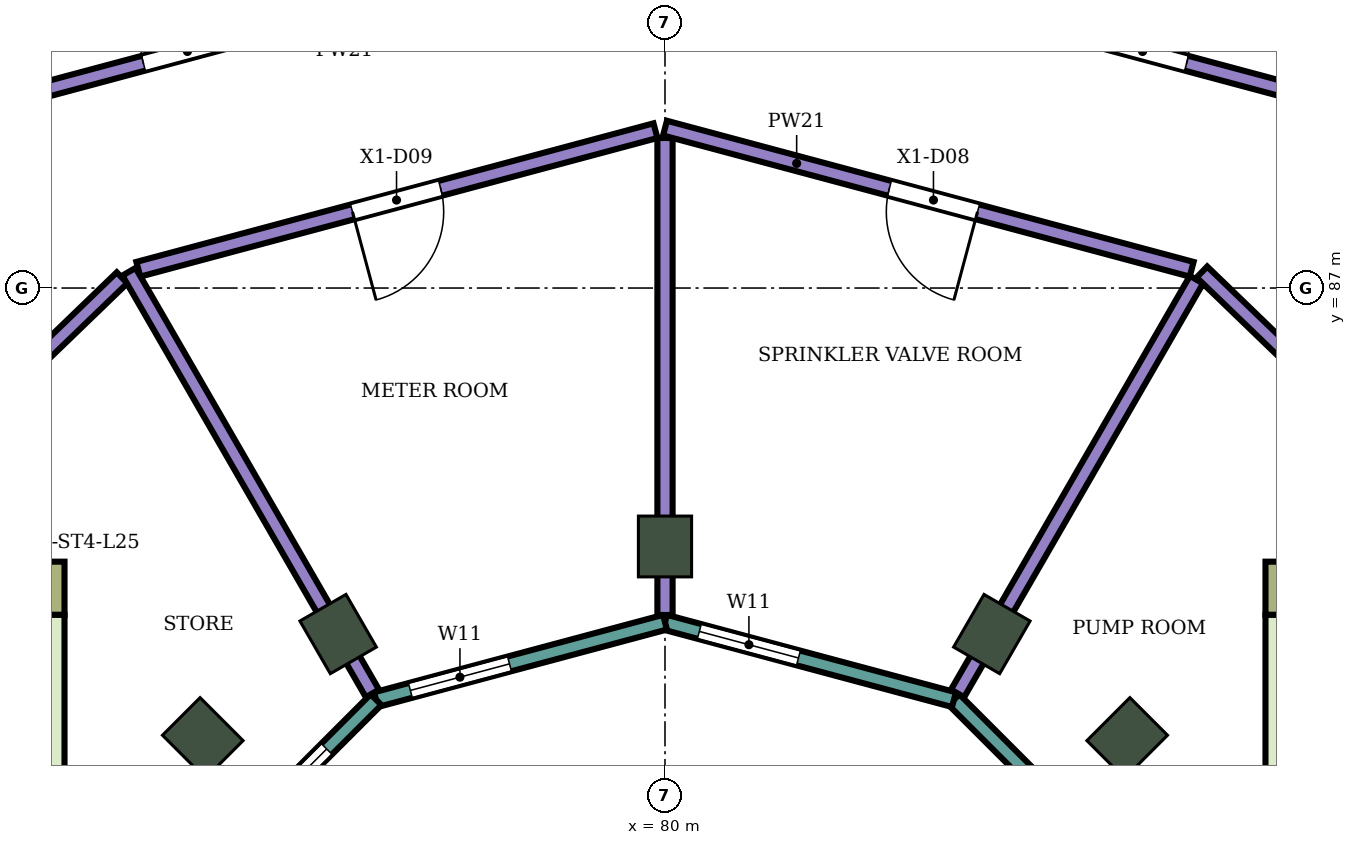
"""IFC4 building model, lengths in metres.
Left out: names, types, materials, properties, quantities, classifications, styles, units other than length and angle.
Written with IfcOpenShell. Run it as: python <this file> out.ifc"""

import sys

from ifc_helpers import new_model, si_unit, direction, frame, frame_2d, origin, origin_2d, place, context, subcontext, project, spatial, rectangle, extrude, element, fill, save


model = new_model("IFC4")
c1 = context("Model", 3, precision=1e-05, world=origin(), true_north=direction((0.0, 1.0)))
c2 = subcontext(c1, "Body", "Model", "MODEL_VIEW")
j1 = project(units=[si_unit("LENGTHUNIT", "METRE"), si_unit("PLANEANGLEUNIT", "RADIAN")], contexts=[c1])
p1 = place(None, origin())
s1 = spatial("IfcSite", under=j1, at=p1, CompositionType="ELEMENT")
p2 = place(p1, origin())
s2 = spatial("IfcBuilding", under=s1, at=p2, CompositionType="ELEMENT")
p3 = place(p2, frame((0.0, 0.0, 109.0)))
s3 = spatial("IfcBuildingStorey", under=s2, at=p3, CompositionType="ELEMENT", Elevation=109.0)
for number, where, z_axis, x_axis in (
    (1, (86.081, 81.081, 0.0), (0.0, 0.0, 1.0), (0.707, 0.707, 0.0)),
    (2, (84.3, 82.448, 0.0), (0.0, 0.0, 1.0), (0.5, 0.866, 0.0)),
    (3, (80.0, 83.6, 0.0), (0.0, 0.0, 1.0), (0.0, 1.0, 0.0)),
    (4, (75.7, 82.448, 0.0), (0.0, 0.0, 1.0), (-0.5, 0.866, 0.0)),
    (5, (73.919, 81.081, 0.0), (0.0, 0.0, 1.0), (-0.707, 0.707, 0.0)),
):
    element("IfcColumn", number, at=place(p3, frame(where, z_axis=z_axis, x_axis=x_axis)), inside=s3, PredefinedType="COLUMN", context=c2, shape_type="SweptSolid", body=[
        extrude(rectangle(XDim=0.8, YDim=0.7, at=origin_2d()), origin(), (0.0, 0.0, 1.0), 5.6),
    ])
p4 = place(p3, frame((87.9, 83.05, 0.0), z_axis=(0.0, 0.0, 1.0), x_axis=(1.0, 0.0, 0.0)))
e6 = element("IfcWall", 6, at=p4, inside=s3, PredefinedType="SHEAR", context=c2, shape_type="SweptSolid", body=[
    extrude(rectangle(XDim=14.8, YDim=0.7, at=frame_2d((7.4, 0.0))), origin(), (0.0, 0.0, 1.0), 5.28),
])
p5 = place(p4, frame((4.2, 0.0, 0.0)))
e7 = element("IfcOpeningElement", 7, at=p5, cuts=e6, PredefinedType="OPENING", context=c2, shape_type="SweptSolid", body=[
    extrude(rectangle(XDim=2.4, YDim=2.4, at=frame_2d((1.2, 1.2))), frame((0.0, 0.36, 0.0), z_axis=(0.0, -1.0, 0.0), x_axis=(1.0, 0.0, 0.0)), (0.0, 0.0, 1.0), 0.72),
])
p6 = place(p3, frame((88.125, 75.0, 0.0), z_axis=(0.0, 0.0, 1.0), x_axis=(0.0, 1.0, 0.0)))
e8 = element("IfcWall", 8, at=p6, inside=s3, PredefinedType="SHEAR", context=c2, shape_type="SweptSolid", body=[
    extrude(rectangle(XDim=7.7, YDim=0.45, at=frame_2d((3.85, 0.0))), origin(), (0.0, 0.0, 1.0), 5.28),
])
p7 = place(p3, frame((72.1, 83.05, 0.0), z_axis=(0.0, 0.0, 1.0), x_axis=(-1.0, 0.0, 0.0)))
e9 = element("IfcWall", 9, at=p7, inside=s3, PredefinedType="SHEAR", context=c2, shape_type="SweptSolid", body=[
    extrude(rectangle(XDim=14.8, YDim=0.7, at=frame_2d((7.4, 0.0))), origin(), (0.0, 0.0, 1.0), 5.28),
])
p8 = place(p7, frame((4.2, 0.0, 0.0)))
e10 = element("IfcOpeningElement", 10, at=p8, cuts=e9, PredefinedType="OPENING", context=c2, shape_type="SweptSolid", body=[
    extrude(rectangle(XDim=2.4, YDim=2.4, at=frame_2d((1.2, 1.2))), frame((0.0, 0.36, 0.0), z_axis=(0.0, -1.0, 0.0), x_axis=(1.0, 0.0, 0.0)), (0.0, 0.0, 1.0), 0.72),
])
p9 = place(p3, frame((71.875, 82.7, 0.0), z_axis=(0.0, 0.0, 1.0), x_axis=(0.0, -1.0, 0.0)))
e11 = element("IfcWall", 11, at=p9, inside=s3, PredefinedType="SHEAR", context=c2, shape_type="SweptSolid", body=[
    extrude(rectangle(XDim=7.7, YDim=0.45, at=frame_2d((3.85, 0.0))), origin(), (0.0, 0.0, 1.0), 5.28),
])
p10 = place(p3, frame((86.585, 78.802, 0.0), z_axis=(0.0, 0.0, 1.0), x_axis=(-0.707106781187, 0.707106781187, 0.0)))
e12 = element("IfcWall", 12, at=p10, inside=s3, PredefinedType="NOTDEFINED", context=c2, shape_type="SweptSolid", body=[
    extrude(rectangle(XDim=3.936, YDim=0.2, at=frame_2d((1.968, 0.0))), origin(), (0.0, 0.0, 1.0), 5.6),
])
p11 = place(p10, frame((0.468, 0.0, 0.9)))
e13 = element("IfcOpeningElement", 13, at=p11, cuts=e12, PredefinedType="OPENING", context=c2, shape_type="SweptSolid", body=[
    extrude(rectangle(XDim=1.75, YDim=2.3, at=frame_2d((0.875, 1.15))), frame((0.0, 0.11, 0.0), z_axis=(0.0, -1.0, 0.0), x_axis=(1.0, 0.0, 0.0)), (0.0, 0.0, 1.0), 0.22),
])
p12 = place(p3, frame((83.802, 81.585, 0.0), z_axis=(0.0, 0.0, 1.0), x_axis=(-0.965933654434, 0.258789828301, 0.0)))
e14 = element("IfcWall", 14, at=p12, inside=s3, PredefinedType="NOTDEFINED", context=c2, shape_type="SweptSolid", body=[
    extrude(rectangle(XDim=3.936, YDim=0.2, at=frame_2d((1.968, 0.0))), origin(), (0.0, 0.0, 1.0), 5.6),
])
p13 = place(p12, frame((2.118, 0.0, 0.9)))
e15 = element("IfcOpeningElement", 15, at=p13, cuts=e14, PredefinedType="OPENING", context=c2, shape_type="SweptSolid", body=[
    extrude(rectangle(XDim=1.35, YDim=2.3, at=frame_2d((0.675, 1.15))), frame((0.0, 0.11, 0.0), z_axis=(0.0, -1.0, 0.0), x_axis=(1.0, 0.0, 0.0)), (0.0, 0.0, 1.0), 0.22),
])
p14 = place(p3, frame((80.0, 82.604, 0.0), z_axis=(0.0, 0.0, 1.0), x_axis=(-0.965933654434, -0.258789828301, 0.0)))
e16 = element("IfcWall", 16, at=p14, inside=s3, PredefinedType="NOTDEFINED", context=c2, shape_type="SweptSolid", body=[
    extrude(rectangle(XDim=3.936, YDim=0.2, at=frame_2d((1.968, 0.0))), origin(), (0.0, 0.0, 1.0), 5.6),
])
p15 = place(p14, frame((2.118, 0.0, 0.9)))
e17 = element("IfcOpeningElement", 17, at=p15, cuts=e16, PredefinedType="OPENING", context=c2, shape_type="SweptSolid", body=[
    extrude(rectangle(XDim=1.35, YDim=2.3, at=frame_2d((0.675, 1.15))), frame((0.0, 0.11, 0.0), z_axis=(0.0, -1.0, 0.0), x_axis=(1.0, 0.0, 0.0)), (0.0, 0.0, 1.0), 0.22),
])
p16 = place(p3, frame((76.198, 81.585, 0.0), z_axis=(0.0, 0.0, 1.0), x_axis=(-0.707106781187, -0.707106781187, 0.0)))
e18 = element("IfcWall", 18, at=p16, inside=s3, PredefinedType="NOTDEFINED", context=c2, shape_type="SweptSolid", body=[
    extrude(rectangle(XDim=3.936, YDim=0.2, at=frame_2d((1.968, 0.0))), origin(), (0.0, 0.0, 1.0), 5.6),
])
p17 = place(p16, frame((0.918, 0.0, 0.9)))
e19 = element("IfcOpeningElement", 19, at=p17, cuts=e18, PredefinedType="OPENING", context=c2, shape_type="SweptSolid", body=[
    extrude(rectangle(XDim=2.55, YDim=2.3, at=frame_2d((1.275, 1.15))), frame((0.0, 0.11, 0.0), z_axis=(0.0, -1.0, 0.0), x_axis=(1.0, 0.0, 0.0)), (0.0, 0.0, 1.0), 0.22),
])
p18 = place(p3, frame((68.987, 83.4, 0.0), z_axis=(0.0, 0.0, 1.0), x_axis=(0.719547721855, 0.694442996922, 0.0)))
e20 = element("IfcWall", 20, at=p18, inside=s3, PredefinedType="PARTITIONING", context=c2, shape_type="SweptSolid", body=[
    extrude(rectangle(XDim=5.378, YDim=0.2, at=frame_2d((2.689, 0.0))), origin(), (0.0, 0.0, 1.0), 5.15),
])
p19 = place(p18, frame((2.144, 0.0, 0.0)))
e21 = element("IfcOpeningElement", 21, at=p19, cuts=e20, PredefinedType="OPENING", context=c2, shape_type="SweptSolid", body=[
    extrude(rectangle(XDim=1.2, YDim=2.4, at=frame_2d((0.6, 1.2))), frame((0.0, 0.11, 0.0), z_axis=(0.0, -1.0, 0.0), x_axis=(1.0, 0.0, 0.0)), (0.0, 0.0, 1.0), 0.22),
])
p20 = place(p3, frame((71.614, 89.549, 0.0), z_axis=(0.0, 0.0, 1.0), x_axis=(0.965931008246, 0.258799705, 0.0)))
e22 = element("IfcWall", 22, at=p20, inside=s3, PredefinedType="PARTITIONING", context=c2, shape_type="SweptSolid", body=[
    extrude(rectangle(XDim=8.632, YDim=0.2, at=frame_2d((4.316, 0.0))), origin(), (0.0, 0.0, 1.0), 5.15),
])
p21 = place(p20, frame((1.577, 0.0, 0.0)))
e23 = element("IfcOpeningElement", 23, at=p21, cuts=e22, PredefinedType="OPENING", context=c2, shape_type="SweptSolid", body=[
    extrude(rectangle(XDim=1.2, YDim=2.4, at=frame_2d((0.6, 1.2))), frame((0.0, 0.11, 0.0), z_axis=(0.0, -1.0, 0.0), x_axis=(1.0, 0.0, 0.0)), (0.0, 0.0, 1.0), 0.22),
])
p22 = place(p3, frame((73.071, 87.247, 0.0), z_axis=(0.0, 0.0, 1.0), x_axis=(0.965914318977, 0.258861987157, 0.0)))
e24 = element("IfcWall", 24, at=p22, inside=s3, PredefinedType="PARTITIONING", context=c2, shape_type="SweptSolid", body=[
    extrude(rectangle(XDim=7.043, YDim=0.2, at=frame_2d((3.521, 0.0))), origin(), (0.0, 0.0, 1.0), 5.15),
])
p23 = place(p22, frame((2.917, 0.0, 0.0)))
e25 = element("IfcOpeningElement", 25, at=p23, cuts=e24, PredefinedType="OPENING", context=c2, shape_type="SweptSolid", body=[
    extrude(rectangle(XDim=1.2, YDim=2.4, at=frame_2d((0.6, 1.2))), frame((0.0, 0.11, 0.0), z_axis=(0.0, -1.0, 0.0), x_axis=(1.0, 0.0, 0.0)), (0.0, 0.0, 1.0), 0.22),
])
p24 = place(p3, frame((72.948, 87.214, 0.0), z_axis=(0.0, 0.0, 1.0), x_axis=(0.500000701339, -0.866024998866, 0.0)))
e26 = element("IfcWall", 26, at=p24, inside=s3, PredefinedType="PARTITIONING", context=c2, shape_type="SweptSolid", body=[
    extrude(rectangle(XDim=6.405, YDim=0.2, at=frame_2d((3.203, 0.0))), origin(), (0.0, 0.0, 1.0), 5.15),
])
p25 = place(p3, frame((80.0, 82.699, 0.0), z_axis=(0.0, 0.0, 1.0), x_axis=(0.0, 1.0, 0.0)))
e27 = element("IfcWall", 27, at=p25, inside=s3, PredefinedType="PARTITIONING", context=c2, shape_type="SweptSolid", body=[
    extrude(rectangle(XDim=6.275, YDim=0.2, at=frame_2d((3.138, 0.0))), origin(), (0.0, 0.0, 1.0), 5.15),
])
p26 = place(p3, frame((80.0, 89.104, 0.0), z_axis=(0.0, 0.0, 1.0), x_axis=(0.965912194639, -0.258869913757, 0.0)))
e28 = element("IfcWall", 28, at=p26, inside=s3, PredefinedType="PARTITIONING", context=c2, shape_type="SweptSolid", body=[
    extrude(rectangle(XDim=7.173, YDim=0.2, at=frame_2d((3.587, 0.0))), origin(), (0.0, 0.0, 1.0), 5.15),
])
p27 = place(p26, frame((3.057, 0.0, 0.0)))
e29 = element("IfcOpeningElement", 29, at=p27, cuts=e28, PredefinedType="OPENING", context=c2, shape_type="SweptSolid", body=[
    extrude(rectangle(XDim=1.2, YDim=2.4, at=frame_2d((0.6, 1.2))), frame((0.0, 0.11, 0.0), z_axis=(0.0, -1.0, 0.0), x_axis=(1.0, 0.0, 0.0)), (0.0, 0.0, 1.0), 0.22),
])
p28 = place(p3, frame((80.0, 91.796, 0.0), z_axis=(0.0, 0.0, 1.0), x_axis=(0.965917643923, -0.258849580177, 0.0)))
e30 = element("IfcWall", 30, at=p28, inside=s3, PredefinedType="PARTITIONING", context=c2, shape_type="SweptSolid", body=[
    extrude(rectangle(XDim=8.602, YDim=0.2, at=frame_2d((4.301, 0.0))), origin(), (0.0, 0.0, 1.0), 5.15),
])
p29 = place(p28, frame((5.905, 0.0, 0.0)))
e31 = element("IfcOpeningElement", 31, at=p29, cuts=e30, PredefinedType="OPENING", context=c2, shape_type="SweptSolid", body=[
    extrude(rectangle(XDim=1.2, YDim=2.4, at=frame_2d((0.6, 1.2))), frame((0.0, 0.11, 0.0), z_axis=(0.0, -1.0, 0.0), x_axis=(1.0, 0.0, 0.0)), (0.0, 0.0, 1.0), 0.22),
])
p30 = place(p28, frame((1.583, 0.0, 0.0)))
e32 = element("IfcOpeningElement", 32, at=p30, cuts=e30, PredefinedType="OPENING", context=c2, shape_type="SweptSolid", body=[
    extrude(rectangle(XDim=1.2, YDim=2.4, at=frame_2d((0.6, 1.2))), frame((0.0, 0.11, 0.0), z_axis=(0.0, -1.0, 0.0), x_axis=(1.0, 0.0, 0.0)), (0.0, 0.0, 1.0), 0.22),
])
p31 = place(p3, frame((83.849, 81.667, 0.0), z_axis=(0.0, 0.0, 1.0), x_axis=(0.500074377092, 0.865982457891, 0.0)))
e33 = element("IfcWall", 33, at=p31, inside=s3, PredefinedType="PARTITIONING", context=c2, shape_type="SweptSolid", body=[
    extrude(rectangle(XDim=6.285, YDim=0.2, at=frame_2d((3.143, 0.0))), origin(), (0.0, 0.0, 1.0), 5.15),
])
p32 = place(p3, frame((87.064, 87.211, 0.0), z_axis=(0.0, 0.0, 1.0), x_axis=(0.719562412484, -0.694427774891, 0.0)))
e34 = element("IfcWall", 34, at=p32, inside=s3, PredefinedType="PARTITIONING", context=c2, shape_type="SweptSolid", body=[
    extrude(rectangle(XDim=5.488, YDim=0.2, at=frame_2d((2.744, 0.0))), origin(), (0.0, 0.0, 1.0), 5.15),
])
p33 = place(p32, frame((2.144, 0.0, 0.0)))
e35 = element("IfcOpeningElement", 35, at=p33, cuts=e34, PredefinedType="OPENING", context=c2, shape_type="SweptSolid", body=[
    extrude(rectangle(XDim=1.2, YDim=2.4, at=frame_2d((0.6, 1.2))), frame((0.0, 0.11, 0.0), z_axis=(0.0, -1.0, 0.0), x_axis=(1.0, 0.0, 0.0)), (0.0, 0.0, 1.0), 0.22),
])
p34 = place(p13, origin())
e36 = element("IfcWindow", 36, at=p34, inside=s3, PartitioningType="SINGLE_PANEL", PredefinedType="WINDOW", context=c2, shape_type="SweptSolid", body=[
    extrude(rectangle(XDim=1.35, YDim=2.3, at=frame_2d((0.675, 1.15))), frame((0.0, 0.03, 0.0), z_axis=(0.0, -1.0, 0.0), x_axis=(1.0, 0.0, 0.0)), (0.0, 0.0, 1.0), 0.06),
])
fill(e15, e36)
p35 = place(p15, origin())
e37 = element("IfcWindow", 37, at=p35, inside=s3, PartitioningType="SINGLE_PANEL", PredefinedType="WINDOW", context=c2, shape_type="SweptSolid", body=[
    extrude(rectangle(XDim=1.35, YDim=2.3, at=frame_2d((0.675, 1.15))), frame((0.0, 0.03, 0.0), z_axis=(0.0, -1.0, 0.0), x_axis=(1.0, 0.0, 0.0)), (0.0, 0.0, 1.0), 0.06),
])
fill(e17, e37)
p36 = place(p17, origin())
e38 = element("IfcWindow", 38, at=p36, inside=s3, PartitioningType="SINGLE_PANEL", PredefinedType="WINDOW", context=c2, shape_type="SweptSolid", body=[
    extrude(rectangle(XDim=2.55, YDim=2.3, at=frame_2d((1.275, 1.15))), frame((0.0, 0.03, 0.0), z_axis=(0.0, -1.0, 0.0), x_axis=(1.0, 0.0, 0.0)), (0.0, 0.0, 1.0), 0.06),
])
fill(e19, e38)
p37 = place(p29, origin())
e39 = element("IfcDoor", 39, at=p37, inside=s3, OperationType="SINGLE_SWING_LEFT", PredefinedType="DOOR", context=c2, shape_type="SweptSolid", body=[
    extrude(rectangle(XDim=1.2, YDim=2.4, at=frame_2d((0.6, 1.2))), frame((0.0, 0.025, 0.0), z_axis=(0.0, -1.0, 0.0), x_axis=(1.0, 0.0, 0.0)), (0.0, 0.0, 1.0), 0.05),
])
fill(e31, e39)
p38 = place(p21, origin())
e40 = element("IfcDoor", 40, at=p38, inside=s3, OperationType="SINGLE_SWING_RIGHT", PredefinedType="DOOR", context=c2, shape_type="SweptSolid", body=[
    extrude(rectangle(XDim=1.2, YDim=2.4, at=frame_2d((0.6, 1.2))), frame((0.0, 0.025, 0.0), z_axis=(0.0, -1.0, 0.0), x_axis=(1.0, 0.0, 0.0)), (0.0, 0.0, 1.0), 0.05),
])
fill(e23, e40)
p39 = place(p27, frame((1.2, 0.0, 0.0), z_axis=(0.0, 0.0, 1.0), x_axis=(-1.0, 0.0, 0.0)))
e41 = element("IfcDoor", 41, at=p39, inside=s3, OperationType="SINGLE_SWING_LEFT", PredefinedType="DOOR", context=c2, shape_type="SweptSolid", body=[
    extrude(rectangle(XDim=1.2, YDim=2.4, at=frame_2d((0.6, 1.2))), frame((0.0, 0.025, 0.0), z_axis=(0.0, -1.0, 0.0), x_axis=(1.0, 0.0, 0.0)), (0.0, 0.0, 1.0), 0.05),
])
fill(e29, e41)
p40 = place(p23, frame((1.2, 0.0, 0.0), z_axis=(0.0, 0.0, 1.0), x_axis=(-1.0, 0.0, 0.0)))
e42 = element("IfcDoor", 42, at=p40, inside=s3, OperationType="SINGLE_SWING_RIGHT", PredefinedType="DOOR", context=c2, shape_type="SweptSolid", body=[
    extrude(rectangle(XDim=1.2, YDim=2.4, at=frame_2d((0.6, 1.2))), frame((0.0, 0.025, 0.0), z_axis=(0.0, -1.0, 0.0), x_axis=(1.0, 0.0, 0.0)), (0.0, 0.0, 1.0), 0.05),
])
fill(e25, e42)
save(model, sys.argv[1])
